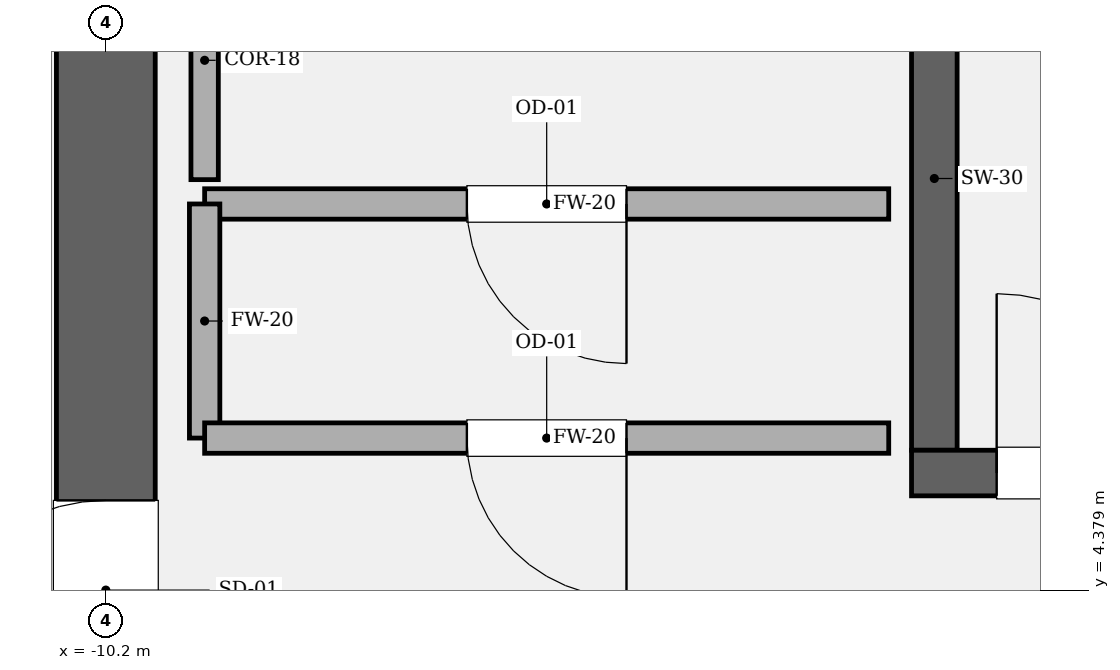
"""IFC4 building model, lengths in metres.
Left out: names, types, materials, properties, quantities, classifications, styles, units other than length and angle.
Written with IfcOpenShell. Run it as: python <this file> out.ifc"""

import sys

from ifc_helpers import new_model, si_unit, direction, frame, frame_2d, origin, place, context, subcontext, project, spatial, rectangle, extrude, element, fill, save


model = new_model("IFC4")
c1 = context("Model", 3, precision=1e-05, world=origin(), true_north=direction((0.0, 1.0)))
c2 = subcontext(c1, "Body", "Model", "MODEL_VIEW")
j1 = project(units=[si_unit("LENGTHUNIT", "METRE"), si_unit("PLANEANGLEUNIT", "RADIAN")], contexts=[c1])
p1 = place(None, origin())
s1 = spatial("IfcSite", under=j1, at=p1, CompositionType="ELEMENT")
p2 = place(p1, origin())
s2 = spatial("IfcBuilding", under=s1, at=p2, CompositionType="ELEMENT")
p3 = place(p2, frame((0.0, 0.0, 208.65)))
s3 = spatial("IfcBuildingStorey", under=s2, at=p3, CompositionType="ELEMENT", Elevation=208.65)
p4 = place(p3, frame((-10.2, -8.875, 0.0), z_axis=(0.0, 0.0, 1.0), x_axis=(0.0, 1.0, 0.0)))
e1 = element("IfcWall", 1, at=p4, inside=s3, PredefinedType="SHEAR", context=c2, shape_type="SweptSolid", body=[
    extrude(rectangle(XDim=17.75, YDim=0.65, at=frame_2d((8.875, 0.0))), origin(), (0.0, 0.0, 1.0), 4.05),
])
p5 = place(p4, frame((12.665, 0.0, 0.0)))
e2 = element("IfcOpeningElement", 2, at=p5, cuts=e1, PredefinedType="OPENING", context=c2, shape_type="SweptSolid", body=[
    extrude(rectangle(XDim=1.18, YDim=2.2, at=frame_2d((0.59, 1.1))), frame((0.0, 0.335, 0.0), z_axis=(0.0, -1.0, 0.0), x_axis=(1.0, 0.0, 0.0)), (0.0, 0.0, 1.0), 0.67),
])
p6 = place(p3, frame((-4.75, 5.3, 0.0), z_axis=(0.0, 0.0, 1.0), x_axis=(0.0, 1.0, 0.0)))
e3 = element("IfcWall", 3, at=p6, inside=s3, PredefinedType="SOLIDWALL", context=c2, shape_type="SweptSolid", body=[
    extrude(rectangle(XDim=3.575, YDim=0.3, at=frame_2d((1.788, 0.0))), origin(), (0.0, 0.0, 1.0), 4.05),
])
p7 = place(p3, frame((-4.9, 5.15, 0.0), z_axis=(0.0, 0.0, 1.0), x_axis=(1.0, 0.0, 0.0)))
e4 = element("IfcWall", 4, at=p7, inside=s3, PredefinedType="SOLIDWALL", context=c2, shape_type="SweptSolid", body=[
    extrude(rectangle(XDim=9.8, YDim=0.3, at=frame_2d((4.9, 0.0))), origin(), (0.0, 0.0, 1.0), 4.05),
])
p8 = place(p7, frame((0.56, 0.0, 0.0)))
e5 = element("IfcOpeningElement", 5, at=p8, cuts=e4, PredefinedType="OPENING", context=c2, shape_type="SweptSolid", body=[
    extrude(rectangle(XDim=1.18, YDim=2.2, at=frame_2d((0.59, 1.1))), frame((0.0, 0.16, 0.0), z_axis=(0.0, -1.0, 0.0), x_axis=(1.0, 0.0, 0.0)), (0.0, 0.0, 1.0), 0.32),
])
p9 = place(p3, frame((-5.05, 6.92, 0.0), z_axis=(0.0, 0.0, 1.0), x_axis=(-1.0, 0.0, 0.0)))
e6 = element("IfcWall", 6, at=p9, inside=s3, PredefinedType="SOLIDWALL", context=c2, shape_type="SweptSolid", body=[
    extrude(rectangle(XDim=4.5, YDim=0.2, at=frame_2d((2.25, 0.0))), origin(), (0.0, 0.0, 1.0), 3.83),
])
p10 = place(p9, frame((1.725, 0.0, 0.0)))
e7 = element("IfcOpeningElement", 7, at=p10, cuts=e6, PredefinedType="OPENING", context=c2, shape_type="SweptSolid", body=[
    extrude(rectangle(XDim=1.05, YDim=2.2, at=frame_2d((0.525, 1.1))), frame((0.0, 0.11, 0.0), z_axis=(0.0, -1.0, 0.0), x_axis=(1.0, 0.0, 0.0)), (0.0, 0.0, 1.0), 0.22),
])
p11 = place(p3, frame((-9.55, 6.92, 0.0), z_axis=(0.0, 0.0, 1.0), x_axis=(0.0, -1.0, 0.0)))
e8 = element("IfcWall", 8, at=p11, inside=s3, PredefinedType="SOLIDWALL", context=c2, shape_type="SweptSolid", body=[
    extrude(rectangle(XDim=1.54, YDim=0.2, at=frame_2d((0.77, 0.0))), origin(), (0.0, 0.0, 1.0), 3.83),
])
p12 = place(p3, frame((-9.55, 5.38, 0.0), z_axis=(0.0, 0.0, 1.0), x_axis=(1.0, 0.0, 0.0)))
e9 = element("IfcWall", 9, at=p12, inside=s3, PredefinedType="SOLIDWALL", context=c2, shape_type="SweptSolid", body=[
    extrude(rectangle(XDim=4.5, YDim=0.2, at=frame_2d((2.25, 0.0))), origin(), (0.0, 0.0, 1.0), 3.83),
])
p13 = place(p12, frame((1.725, 0.0, 0.0)))
e10 = element("IfcOpeningElement", 10, at=p13, cuts=e9, PredefinedType="OPENING", context=c2, shape_type="SweptSolid", body=[
    extrude(rectangle(XDim=1.05, YDim=2.2, at=frame_2d((0.525, 1.1))), frame((0.0, 0.11, 0.0), z_axis=(0.0, -1.0, 0.0), x_axis=(1.0, 0.0, 0.0)), (0.0, 0.0, 1.0), 0.22),
])
p14 = place(p3, frame((-9.55, 8.65, 0.0), z_axis=(0.0, 0.0, 1.0), x_axis=(0.0, -1.0, 0.0)))
e11 = element("IfcWall", 11, at=p14, inside=s3, PredefinedType="PARTITIONING", context=c2, shape_type="SweptSolid", body=[
    extrude(rectangle(XDim=1.57, YDim=0.18, at=frame_2d((0.785, 0.0))), origin(), (0.0, 0.0, 1.0), 3.83),
])
p15 = place(p8, origin())
e12 = element("IfcDoor", 12, at=p15, inside=s3, OperationType="SINGLE_SWING_LEFT", PredefinedType="DOOR", context=c2, shape_type="SweptSolid", body=[
    extrude(rectangle(XDim=1.18, YDim=2.2, at=frame_2d((0.59, 1.1))), frame((0.0, 0.025, 0.0), z_axis=(0.0, -1.0, 0.0), x_axis=(1.0, 0.0, 0.0)), (0.0, 0.0, 1.0), 0.05),
])
fill(e5, e12)
p16 = place(p5, origin())
e13 = element("IfcDoor", 13, at=p16, inside=s3, OperationType="SINGLE_SWING_LEFT", PredefinedType="DOOR", context=c2, shape_type="SweptSolid", body=[
    extrude(rectangle(XDim=1.18, YDim=2.2, at=frame_2d((0.59, 1.1))), frame((0.0, 0.025, 0.0), z_axis=(0.0, -1.0, 0.0), x_axis=(1.0, 0.0, 0.0)), (0.0, 0.0, 1.0), 0.05),
])
fill(e2, e13)
p17 = place(p13, origin())
e14 = element("IfcDoor", 14, at=p17, inside=s3, OperationType="SINGLE_SWING_RIGHT", PredefinedType="DOOR", context=c2, shape_type="SweptSolid", body=[
    extrude(rectangle(XDim=1.05, YDim=2.2, at=frame_2d((0.525, 1.1))), frame((0.0, 0.025, 0.0), z_axis=(0.0, -1.0, 0.0), x_axis=(1.0, 0.0, 0.0)), (0.0, 0.0, 1.0), 0.05),
])
fill(e10, e14)
p18 = place(p10, origin())
e15 = element("IfcDoor", 15, at=p18, inside=s3, OperationType="SINGLE_SWING_LEFT", PredefinedType="DOOR", context=c2, shape_type="SweptSolid", body=[
    extrude(rectangle(XDim=1.05, YDim=2.2, at=frame_2d((0.525, 1.1))), frame((0.0, 0.025, 0.0), z_axis=(0.0, -1.0, 0.0), x_axis=(1.0, 0.0, 0.0)), (0.0, 0.0, 1.0), 0.05),
])
fill(e7, e15)
save(model, sys.argv[1])
